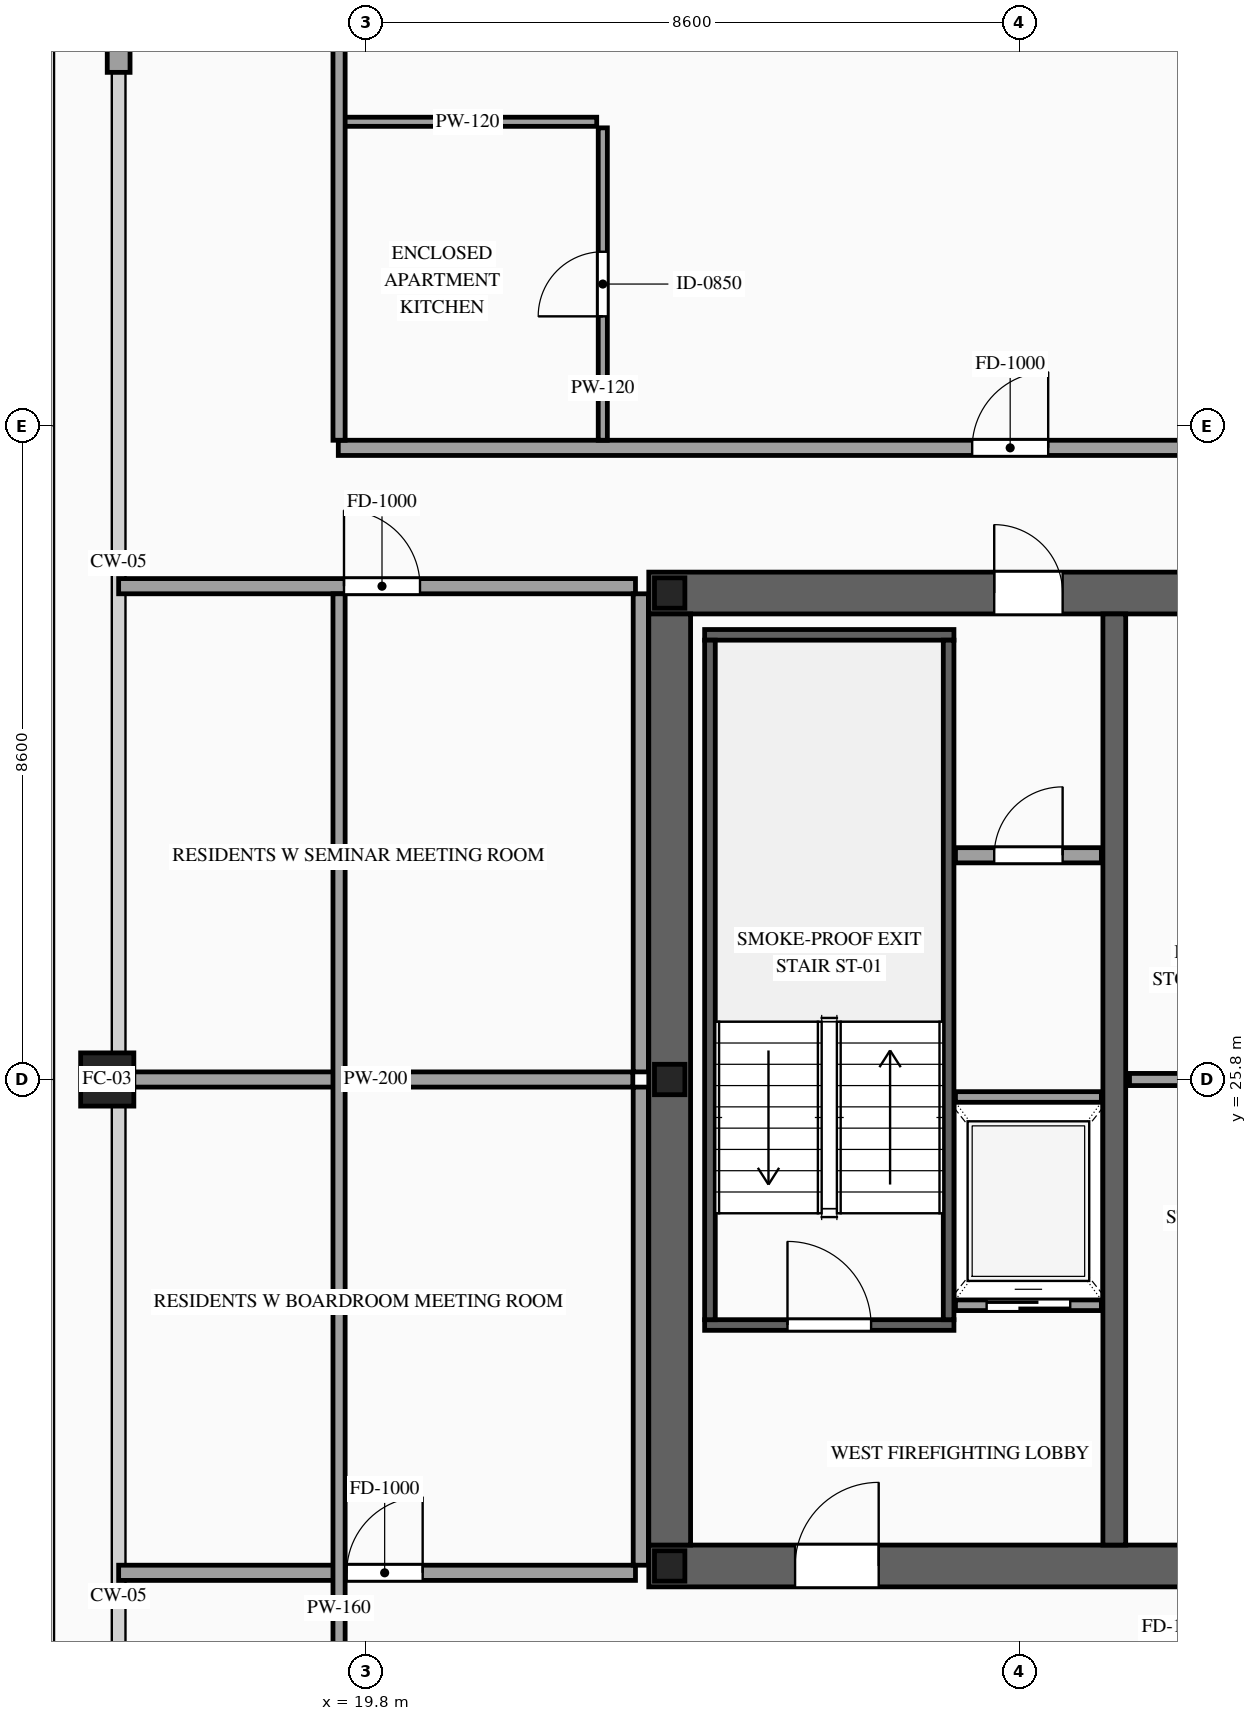
"""IFC4 building model, lengths in metres.
Left out: names, types, materials, properties, quantities, classifications, styles, units other than length and angle.
Written with IfcOpenShell. Run it as: python <this file> out.ifc"""

import sys

from ifc_helpers import new_model, si_unit, direction, frame, frame_2d, origin, origin_2d, place, context, subcontext, project, spatial, rectangle, hollow_rectangle, i_section, extrude, source, transform, mapped, element, fill, save


model = new_model("IFC4")
c1 = context("Model", 3, precision=1e-05, world=origin(), true_north=direction((0.0, 1.0)))
c2 = subcontext(c1, "Body", "Model", "MODEL_VIEW")
j1 = project(units=[si_unit("LENGTHUNIT", "METRE"), si_unit("PLANEANGLEUNIT", "RADIAN")], contexts=[c1])
p1 = place(None, origin())
s1 = spatial("IfcSite", under=j1, at=p1, CompositionType="ELEMENT")
p2 = place(p1, origin())
s2 = spatial("IfcBuilding", under=s1, at=p2, CompositionType="ELEMENT")
p3 = place(p2, frame((0.0, 0.0, 224.1)))
s3 = spatial("IfcBuildingStorey", under=s2, at=p3, CompositionType="ELEMENT", Elevation=224.1)
p4 = place(p3, frame((23.525, 19.4, 0.0), z_axis=(0.0, 0.0, 1.0), x_axis=(1.0, 0.0, 0.0)))
e1 = element("IfcWall", 1, at=p4, inside=s3, PredefinedType="SHEAR", context=c2, shape_type="SweptSolid", body=[
    extrude(rectangle(XDim=26.95, YDim=0.55, at=frame_2d((13.475, 0.0))), origin(), (0.0, 0.0, 1.0), 3.5),
])
p5 = place(p4, frame((1.925, 0.0, 0.0)))
e2 = element("IfcOpeningElement", 2, at=p5, cuts=e1, PredefinedType="OPENING", context=c2, shape_type="SweptSolid", body=[
    extrude(rectangle(XDim=1.1, YDim=2.2, at=frame_2d((0.55, 1.1))), frame((0.0, 0.29, 0.0), z_axis=(0.0, -1.0, 0.0), x_axis=(1.0, 0.0, 0.0)), (0.0, 0.0, 1.0), 0.58),
])
p6 = place(p4, frame((9.825, 0.0, 0.0)))
e3 = element("IfcOpeningElement", 3, at=p6, cuts=e1, PredefinedType="OPENING", context=c2, shape_type="SweptSolid", body=[
    extrude(rectangle(XDim=1.1, YDim=2.2, at=frame_2d((0.55, 1.1))), frame((0.0, 0.29, 0.0), z_axis=(0.0, -1.0, 0.0), x_axis=(1.0, 0.0, 0.0)), (0.0, 0.0, 1.0), 0.58),
])
p7 = place(p4, frame((23.025, 0.0, 0.0)))
e4 = element("IfcOpeningElement", 4, at=p7, cuts=e1, PredefinedType="OPENING", context=c2, shape_type="SweptSolid", body=[
    extrude(rectangle(XDim=1.1, YDim=2.2, at=frame_2d((0.55, 1.1))), frame((0.0, 0.29, 0.0), z_axis=(0.0, -1.0, 0.0), x_axis=(1.0, 0.0, 0.0)), (0.0, 0.0, 1.0), 0.58),
])
p8 = place(p4, frame((19.645, 0.0, 0.0)))
e5 = element("IfcOpeningElement", 5, at=p8, cuts=e1, PredefinedType="OPENING", context=c2, shape_type="SweptSolid", body=[
    extrude(rectangle(XDim=0.9, YDim=2.15, at=frame_2d((0.45, 1.075))), frame((0.0, 0.29, 0.0), z_axis=(0.0, -1.0, 0.0), x_axis=(1.0, 0.0, 0.0)), (0.0, 0.0, 1.0), 0.58),
])
p9 = place(p4, frame((18.205, 0.0, 0.0)))
e6 = element("IfcOpeningElement", 6, at=p9, cuts=e1, PredefinedType="OPENING", context=c2, shape_type="SweptSolid", body=[
    extrude(rectangle(XDim=0.9, YDim=2.15, at=frame_2d((0.45, 1.075))), frame((0.0, 0.29, 0.0), z_axis=(0.0, -1.0, 0.0), x_axis=(1.0, 0.0, 0.0)), (0.0, 0.0, 1.0), 0.58),
])
p10 = place(p3, frame((23.525, 32.2, 0.0), z_axis=(0.0, 0.0, 1.0), x_axis=(1.0, 0.0, 0.0)))
e7 = element("IfcWall", 7, at=p10, inside=s3, PredefinedType="SHEAR", context=c2, shape_type="SweptSolid", body=[
    extrude(rectangle(XDim=26.95, YDim=0.55, at=frame_2d((13.475, 0.0))), origin(), (0.0, 0.0, 1.0), 3.5),
])
p11 = place(p10, frame((4.545, 0.0, 0.0)))
e8 = element("IfcOpeningElement", 8, at=p11, cuts=e7, PredefinedType="OPENING", context=c2, shape_type="SweptSolid", body=[
    extrude(rectangle(XDim=0.9, YDim=2.15, at=frame_2d((0.45, 1.075))), frame((0.0, 0.29, 0.0), z_axis=(0.0, -1.0, 0.0), x_axis=(1.0, 0.0, 0.0)), (0.0, 0.0, 1.0), 0.58),
])
p12 = place(p10, frame((9.825, 0.0, 0.0)))
e9 = element("IfcOpeningElement", 9, at=p12, cuts=e7, PredefinedType="OPENING", context=c2, shape_type="SweptSolid", body=[
    extrude(rectangle(XDim=1.1, YDim=2.2, at=frame_2d((0.55, 1.1))), frame((0.0, 0.29, 0.0), z_axis=(0.0, -1.0, 0.0), x_axis=(1.0, 0.0, 0.0)), (0.0, 0.0, 1.0), 0.58),
])
p13 = place(p10, frame((15.675, 0.0, 0.0)))
e10 = element("IfcOpeningElement", 10, at=p13, cuts=e7, PredefinedType="OPENING", context=c2, shape_type="SweptSolid", body=[
    extrude(rectangle(XDim=1.1, YDim=2.2, at=frame_2d((0.55, 1.1))), frame((0.0, 0.29, 0.0), z_axis=(0.0, -1.0, 0.0), x_axis=(1.0, 0.0, 0.0)), (0.0, 0.0, 1.0), 0.58),
])
p14 = place(p10, frame((19.645, 0.0, 0.0)))
e11 = element("IfcOpeningElement", 11, at=p14, cuts=e7, PredefinedType="OPENING", context=c2, shape_type="SweptSolid", body=[
    extrude(rectangle(XDim=0.9, YDim=2.15, at=frame_2d((0.45, 1.075))), frame((0.0, 0.29, 0.0), z_axis=(0.0, -1.0, 0.0), x_axis=(1.0, 0.0, 0.0)), (0.0, 0.0, 1.0), 0.58),
])
m1 = source(origin(), c2, "Body", "SweptSolid", [
    extrude(rectangle(XDim=12.25, YDim=0.55, at=frame_2d((6.125, 0.0))), origin(), (0.0, 0.0, 1.0), 3.5),
])
p15 = place(p3, frame((23.8, 19.675, 0.0), z_axis=(0.0, 0.0, 1.0), x_axis=(0.0, 1.0, 0.0)))
e12 = element("IfcWall", 12, at=p15, inside=s3, PredefinedType="SHEAR", context=c2, shape_type="MappedRepresentation", body=[
    mapped(m1, transform((0.0, 0.0, 0.0), scale=1.0)),
])
m2 = source(origin(), c2, "Body", "SweptSolid", [
    extrude(rectangle(XDim=12.25, YDim=0.3, at=frame_2d((6.125, 0.0))), origin(), (0.0, 0.0, 1.0), 3.5),
])
p16 = place(p3, frame((29.65, 19.675, 0.0), z_axis=(0.0, 0.0, 1.0), x_axis=(0.0, 1.0, 0.0)))
e13 = element("IfcWall", 13, at=p16, inside=s3, PredefinedType="SOLIDWALL", context=c2, shape_type="MappedRepresentation", body=[
    mapped(m2, transform((0.0, 0.0, 0.0), scale=1.0)),
])
m3 = source(origin(), c2, "Body", "SweptSolid", [
    extrude(i_section(OverallWidth=0.4, OverallDepth=0.4, WebThickness=0.013, FlangeThickness=0.021, at=origin_2d()), origin(), (0.0, 0.0, 1.0), 3.5),
])
for number, where, z_axis, x_axis in (
    (14, (23.8, 19.4, 0.0), (0.0, 0.0, 1.0), (1.0, 0.0, 0.0)),
    (15, (23.8, 25.8, 0.0), (0.0, 0.0, 1.0), (1.0, 0.0, 0.0)),
    (16, (23.8, 32.2, 0.0), (0.0, 0.0, 1.0), (1.0, 0.0, 0.0)),
):
    element("IfcColumn", number, at=place(p3, frame(where, z_axis=z_axis, x_axis=x_axis)), inside=s3, PredefinedType="COLUMN", context=c2, shape_type="MappedRepresentation", body=[
        mapped(m3, transform((0.0, 0.0, 0.0), scale=1.0)),
    ])
m4 = source(origin(), c2, "Body", "SweptSolid", [
    extrude(hollow_rectangle(XDim=0.7, YDim=0.7, WallThickness=0.032, at=origin_2d()), origin(), (0.0, 0.0, 1.0), 3.5),
])
p17 = place(p3, frame((16.4, 25.8, 0.0), z_axis=(0.0, 0.0, 1.0), x_axis=(1.0, 0.0, 0.0)))
e17 = element("IfcColumn", 17, at=p17, inside=s3, PredefinedType="COLUMN", context=c2, shape_type="MappedRepresentation", body=[
    mapped(m4, transform((0.0, 0.0, 0.0), scale=1.0)),
])
m5 = source(origin(), c2, "Body", "SweptSolid", [
    extrude(rectangle(XDim=3.15, YDim=0.3, at=frame_2d((1.575, 0.0))), origin(), (0.0, 0.0, 1.0), 2.835),
])
p18 = place(p3, frame((16.55, 39.05, 0.0), z_axis=(0.0, 0.0, 1.0), x_axis=(0.0, 1.0, 0.0)))
e18 = element("IfcWall", 18, at=p18, inside=s3, PredefinedType="SOLIDWALL", context=c2, shape_type="MappedRepresentation", body=[
    mapped(m5, transform((0.0, 0.0, 0.0), scale=1.0)),
])
p19 = place(p3, frame((27.56, 22.83, 0.0), z_axis=(0.0, 0.0, 1.0), x_axis=(1.0, 0.0, 0.0)))
e19 = element("IfcWall", 19, at=p19, inside=s3, PredefinedType="SOLIDWALL", context=c2, shape_type="SweptSolid", body=[
    extrude(rectangle(XDim=1.92, YDim=0.14, at=frame_2d((0.96, 0.0))), origin(), (0.0, 0.0, 1.0), 3.28),
])
p20 = place(p19, frame((0.41, 0.0, 0.0)))
e20 = element("IfcOpeningElement", 20, at=p20, cuts=e19, PredefinedType="OPENING", context=c2, shape_type="SweptSolid", body=[
    extrude(rectangle(XDim=1.1, YDim=2.2, at=frame_2d((0.55, 1.1))), frame((0.0, 0.085, 0.0), z_axis=(0.0, -1.0, 0.0), x_axis=(1.0, 0.0, 0.0)), (0.0, 0.0, 1.0), 0.17),
])
m6 = source(origin(), c2, "Body", "SweptSolid", [
    extrude(rectangle(XDim=1.92, YDim=0.14, at=frame_2d((0.96, 0.0))), origin(), (0.0, 0.0, 1.0), 3.28),
])
p21 = place(p3, frame((27.56, 25.57, 0.0), z_axis=(0.0, 0.0, 1.0), x_axis=(1.0, 0.0, 0.0)))
e21 = element("IfcWall", 21, at=p21, inside=s3, PredefinedType="SOLIDWALL", context=c2, shape_type="MappedRepresentation", body=[
    mapped(m6, transform((0.0, 0.0, 0.0), scale=1.0)),
])
p22 = place(p3, frame((24.26, 22.57, 0.0), z_axis=(0.0, 0.0, 1.0), x_axis=(1.0, 0.0, 0.0)))
e22 = element("IfcWall", 22, at=p22, inside=s3, PredefinedType="SOLIDWALL", context=c2, shape_type="SweptSolid", body=[
    extrude(rectangle(XDim=3.28, YDim=0.14, at=frame_2d((1.64, 0.0))), origin(), (0.0, 0.0, 1.0), 3.28),
])
p23 = place(p22, frame((1.09, 0.0, 0.0)))
e23 = element("IfcOpeningElement", 23, at=p23, cuts=e22, PredefinedType="OPENING", context=c2, shape_type="SweptSolid", body=[
    extrude(rectangle(XDim=1.1, YDim=2.2, at=frame_2d((0.55, 1.1))), frame((0.0, 0.085, 0.0), z_axis=(0.0, -1.0, 0.0), x_axis=(1.0, 0.0, 0.0)), (0.0, 0.0, 1.0), 0.17),
])
m7 = source(origin(), c2, "Body", "SweptSolid", [
    extrude(rectangle(XDim=3.28, YDim=0.14, at=frame_2d((1.64, 0.0))), origin(), (0.0, 0.0, 1.0), 3.28),
])
p24 = place(p3, frame((24.26, 31.65, 0.0), z_axis=(0.0, 0.0, 1.0), x_axis=(1.0, 0.0, 0.0)))
e24 = element("IfcWall", 24, at=p24, inside=s3, PredefinedType="SOLIDWALL", context=c2, shape_type="MappedRepresentation", body=[
    mapped(m7, transform((0.0, 0.0, 0.0), scale=1.0)),
])
m8 = source(origin(), c2, "Body", "SweptSolid", [
    extrude(rectangle(XDim=8.94, YDim=0.14, at=frame_2d((4.47, 0.0))), origin(), (0.0, 0.0, 1.0), 3.28),
])
for number, where, z_axis, x_axis in (
    (25, (24.33, 22.64, 0.0), (0.0, 0.0, 1.0), (0.0, 1.0, 0.0)),
    (26, (27.47, 22.64, 0.0), (0.0, 0.0, 1.0), (0.0, 1.0, 0.0)),
):
    element("IfcWall", number, at=place(p3, frame(where, z_axis=z_axis, x_axis=x_axis)), inside=s3, PredefinedType="SOLIDWALL", context=c2, shape_type="MappedRepresentation", body=[
        mapped(m8, transform((0.0, 0.0, 0.0), scale=1.0)),
    ])
p25 = place(p3, frame((27.56, 28.75, 0.0), z_axis=(0.0, 0.0, 1.0), x_axis=(1.0, 0.0, 0.0)))
e27 = element("IfcWall", 27, at=p25, inside=s3, PredefinedType="PARTITIONING", context=c2, shape_type="SweptSolid", body=[
    extrude(rectangle(XDim=1.92, YDim=0.2, at=frame_2d((0.96, 0.0))), origin(), (0.0, 0.0, 1.0), 3.28),
])
p26 = place(p25, frame((0.51, 0.0, 0.0)))
e28 = element("IfcOpeningElement", 28, at=p26, cuts=e27, PredefinedType="OPENING", context=c2, shape_type="SweptSolid", body=[
    extrude(rectangle(XDim=0.9, YDim=2.15, at=frame_2d((0.45, 1.075))), frame((0.0, 0.115, 0.0), z_axis=(0.0, -1.0, 0.0), x_axis=(1.0, 0.0, 0.0)), (0.0, 0.0, 1.0), 0.23),
])
m9 = source(origin(), c2, "Body", "SweptSolid", [
    extrude(rectangle(XDim=2.47, YDim=0.16, at=frame_2d((1.235, 0.0))), origin(), (0.0, 0.0, 1.0), 3.28),
])
p27 = place(p3, frame((29.85, 25.8, 0.0), z_axis=(0.0, 0.0, 1.0), x_axis=(1.0, 0.0, 0.0)))
e29 = element("IfcWall", 29, at=p27, inside=s3, PredefinedType="PARTITIONING", context=c2, shape_type="MappedRepresentation", body=[
    mapped(m9, transform((0.0, 0.0, 0.0), scale=1.0)),
])
p28 = place(p3, frame((19.44, 34.11, 0.0), z_axis=(0.0, 0.0, 1.0), x_axis=(1.0, 0.0, 0.0)))
e30 = element("IfcWall", 30, at=p28, inside=s3, PredefinedType="PARTITIONING", context=c2, shape_type="SweptSolid", body=[
    extrude(rectangle(XDim=17.48, YDim=0.2, at=frame_2d((8.74, 0.0))), origin(), (0.0, 0.0, 1.0), 3.28),
])
p29 = place(p28, frame((8.34, 0.0, 0.0)))
e31 = element("IfcOpeningElement", 31, at=p29, cuts=e30, PredefinedType="OPENING", context=c2, shape_type="SweptSolid", body=[
    extrude(rectangle(XDim=1.0, YDim=2.2, at=frame_2d((0.5, 1.1))), frame((0.0, 0.115, 0.0), z_axis=(0.0, -1.0, 0.0), x_axis=(1.0, 0.0, 0.0)), (0.0, 0.0, 1.0), 0.23),
])
m10 = source(origin(), c2, "Body", "SweptSolid", [
    extrude(rectangle(XDim=3.4, YDim=0.12, at=frame_2d((1.7, 0.0))), origin(), (0.0, 0.0, 1.0), 3.28),
])
p30 = place(p3, frame((19.44, 38.4, 0.0), z_axis=(0.0, 0.0, 1.0), x_axis=(1.0, 0.0, 0.0)))
e32 = element("IfcWall", 32, at=p30, inside=s3, PredefinedType="PARTITIONING", context=c2, shape_type="MappedRepresentation", body=[
    mapped(m10, transform((0.0, 0.0, 0.0), scale=1.0)),
])
p31 = place(p3, frame((22.92, 34.21, 0.0), z_axis=(0.0, 0.0, 1.0), x_axis=(0.0, 1.0, 0.0)))
e33 = element("IfcWall", 33, at=p31, inside=s3, PredefinedType="PARTITIONING", context=c2, shape_type="SweptSolid", body=[
    extrude(rectangle(XDim=4.11, YDim=0.12, at=frame_2d((2.055, 0.0))), origin(), (0.0, 0.0, 1.0), 3.28),
])
p32 = place(p31, frame((1.63, 0.0, 0.0)))
e34 = element("IfcOpeningElement", 34, at=p32, cuts=e33, PredefinedType="OPENING", context=c2, shape_type="SweptSolid", body=[
    extrude(rectangle(XDim=0.85, YDim=2.1, at=frame_2d((0.425, 1.05))), frame((0.0, 0.075, 0.0), z_axis=(0.0, -1.0, 0.0), x_axis=(1.0, 0.0, 0.0)), (0.0, 0.0, 1.0), 0.15),
])
m11 = source(origin(), c2, "Body", "SweptSolid", [
    extrude(rectangle(XDim=11.89, YDim=0.16, at=frame_2d((5.945, 0.0))), origin(), (0.0, 0.0, 1.0), 3.28),
])
p33 = place(p3, frame((19.45, 34.21, 0.0), z_axis=(0.0, 0.0, 1.0), x_axis=(0.0, 1.0, 0.0)))
e35 = element("IfcWall", 35, at=p33, inside=s3, PredefinedType="PARTITIONING", context=c2, shape_type="MappedRepresentation", body=[
    mapped(m11, transform((0.0, 0.0, 0.0), scale=1.0)),
])
p34 = place(p3, frame((16.55, 19.31, 0.0), z_axis=(0.0, 0.0, 1.0), x_axis=(1.0, 0.0, 0.0)))
e36 = element("IfcWall", 36, at=p34, inside=s3, PredefinedType="PARTITIONING", context=c2, shape_type="SweptSolid", body=[
    extrude(rectangle(XDim=6.8, YDim=0.2, at=frame_2d((3.4, 0.0))), origin(), (0.0, 0.0, 1.0), 2.825),
])
p35 = place(p34, frame((3.0, 0.0, 0.0)))
e37 = element("IfcOpeningElement", 37, at=p35, cuts=e36, PredefinedType="OPENING", context=c2, shape_type="SweptSolid", body=[
    extrude(rectangle(XDim=1.0, YDim=2.2, at=frame_2d((0.5, 1.1))), frame((0.0, 0.115, 0.0), z_axis=(0.0, -1.0, 0.0), x_axis=(1.0, 0.0, 0.0)), (0.0, 0.0, 1.0), 0.23),
])
m12 = source(origin(), c2, "Body", "SweptSolid", [
    extrude(rectangle(XDim=6.765, YDim=0.2, at=frame_2d((3.382, 0.0))), origin(), (0.0, 0.0, 1.0), 2.787),
])
p36 = place(p3, frame((16.55, 25.8, 0.0), z_axis=(0.0, 0.0, 1.0), x_axis=(1.0, 0.0, 0.0)))
e38 = element("IfcWall", 38, at=p36, inside=s3, PredefinedType="PARTITIONING", context=c2, shape_type="MappedRepresentation", body=[
    mapped(m12, transform((0.0, 0.0, 0.0), scale=1.0)),
])
m13 = source(origin(), c2, "Body", "SweptSolid", [
    extrude(rectangle(XDim=6.29, YDim=0.2, at=frame_2d((3.145, 0.0))), origin(), (0.0, 0.0, 1.0), 3.28),
])
p37 = place(p3, frame((23.42, 19.41, 0.0), z_axis=(0.0, 0.0, 1.0), x_axis=(0.0, 1.0, 0.0)))
e39 = element("IfcWall", 39, at=p37, inside=s3, PredefinedType="PARTITIONING", context=c2, shape_type="MappedRepresentation", body=[
    mapped(m13, transform((0.0, 0.0, 0.0), scale=1.0)),
])
p38 = place(p3, frame((16.55, 32.29, 0.0), z_axis=(0.0, 0.0, 1.0), x_axis=(1.0, 0.0, 0.0)))
e40 = element("IfcWall", 40, at=p38, inside=s3, PredefinedType="PARTITIONING", context=c2, shape_type="SweptSolid", body=[
    extrude(rectangle(XDim=6.8, YDim=0.2, at=frame_2d((3.4, 0.0))), origin(), (0.0, 0.0, 1.0), 2.825),
])
p39 = place(p38, frame((2.965, 0.0, 0.0)))
e41 = element("IfcOpeningElement", 41, at=p39, cuts=e40, PredefinedType="OPENING", context=c2, shape_type="SweptSolid", body=[
    extrude(rectangle(XDim=1.0, YDim=2.2, at=frame_2d((0.5, 1.1))), frame((0.0, 0.115, 0.0), z_axis=(0.0, -1.0, 0.0), x_axis=(1.0, 0.0, 0.0)), (0.0, 0.0, 1.0), 0.23),
])
m14 = source(origin(), c2, "Body", "SweptSolid", [
    extrude(rectangle(XDim=26.69, YDim=0.16, at=frame_2d((13.345, 0.0))), origin(), (0.0, 0.0, 1.0), 3.28),
])
p40 = place(p3, frame((19.45, 5.5, 0.0), z_axis=(0.0, 0.0, 1.0), x_axis=(0.0, 1.0, 0.0)))
e42 = element("IfcWall", 42, at=p40, inside=s3, PredefinedType="PARTITIONING", context=c2, shape_type="MappedRepresentation", body=[
    mapped(m14, transform((0.0, 0.0, 0.0), scale=1.0)),
])
p41 = place(p3, frame((23.42, 25.9, 0.0), z_axis=(0.0, 0.0, 1.0), x_axis=(0.0, 1.0, 0.0)))
e43 = element("IfcWall", 43, at=p41, inside=s3, PredefinedType="PARTITIONING", context=c2, shape_type="MappedRepresentation", body=[
    mapped(m13, transform((0.0, 0.0, 0.0), scale=1.0)),
])
m15 = source(origin(), c2, "Body", "SweptSolid", [
    extrude(rectangle(XDim=1.1, YDim=2.2, at=frame_2d((0.55, 1.1))), frame((0.0, 0.025, 0.0), z_axis=(0.0, -1.0, 0.0), x_axis=(1.0, 0.0, 0.0)), (0.0, 0.0, 1.0), 0.05),
])
p42 = place(p20, origin())
e44 = element("IfcDoor", 44, at=p42, inside=s3, OperationType="SLIDING_TO_LEFT", PredefinedType="DOOR", context=c2, shape_type="MappedRepresentation", body=[
    mapped(m15, transform((0.0, 0.0, 0.0), scale=1.0)),
])
fill(e20, e44)
m16 = source(origin(), c2, "Body", "SweptSolid", [
    extrude(rectangle(XDim=1.1, YDim=2.2, at=frame_2d((0.55, 1.1))), frame((0.0, 0.025, 0.0), z_axis=(0.0, -1.0, 0.0), x_axis=(1.0, 0.0, 0.0)), (0.0, 0.0, 1.0), 0.05),
])
p43 = place(p23, origin())
e45 = element("IfcDoor", 45, at=p43, inside=s3, OperationType="SINGLE_SWING_LEFT", PredefinedType="DOOR", context=c2, shape_type="MappedRepresentation", body=[
    mapped(m16, transform((0.0, 0.0, 0.0), scale=1.0)),
])
fill(e23, e45)
p44 = place(p5, origin())
e46 = element("IfcDoor", 46, at=p44, inside=s3, OperationType="SINGLE_SWING_RIGHT", PredefinedType="DOOR", context=c2, shape_type="MappedRepresentation", body=[
    mapped(m16, transform((0.0, 0.0, 0.0), scale=1.0)),
])
fill(e2, e46)
m17 = source(origin(), c2, "Body", "SweptSolid", [
    extrude(rectangle(XDim=0.9, YDim=2.15, at=frame_2d((0.45, 1.075))), frame((0.0, 0.025, 0.0), z_axis=(0.0, -1.0, 0.0), x_axis=(1.0, 0.0, 0.0)), (0.0, 0.0, 1.0), 0.05),
])
p45 = place(p11, origin())
e47 = element("IfcDoor", 47, at=p45, inside=s3, OperationType="SINGLE_SWING_LEFT", PredefinedType="DOOR", context=c2, shape_type="MappedRepresentation", body=[
    mapped(m17, transform((0.0, 0.0, 0.0), scale=1.0)),
])
fill(e8, e47)
p46 = place(p26, origin())
e48 = element("IfcDoor", 48, at=p46, inside=s3, OperationType="SINGLE_SWING_RIGHT", PredefinedType="DOOR", context=c2, shape_type="MappedRepresentation", body=[
    mapped(m17, transform((0.0, 0.0, 0.0), scale=1.0)),
])
fill(e28, e48)
m18 = source(origin(), c2, "Body", "SweptSolid", [
    extrude(rectangle(XDim=1.0, YDim=2.2, at=frame_2d((0.5, 1.1))), frame((0.0, 0.025, 0.0), z_axis=(0.0, -1.0, 0.0), x_axis=(1.0, 0.0, 0.0)), (0.0, 0.0, 1.0), 0.05),
])
p47 = place(p29, origin())
e49 = element("IfcDoor", 49, at=p47, inside=s3, OperationType="SINGLE_SWING_RIGHT", PredefinedType="DOOR", context=c2, shape_type="MappedRepresentation", body=[
    mapped(m18, transform((0.0, 0.0, 0.0), scale=1.0)),
])
fill(e31, e49)
m19 = source(origin(), c2, "Body", "SweptSolid", [
    extrude(rectangle(XDim=0.85, YDim=2.1, at=frame_2d((0.425, 1.05))), frame((0.0, 0.025, 0.0), z_axis=(0.0, -1.0, 0.0), x_axis=(1.0, 0.0, 0.0)), (0.0, 0.0, 1.0), 0.05),
])
p48 = place(p32, origin())
e50 = element("IfcDoor", 50, at=p48, inside=s3, OperationType="SINGLE_SWING_LEFT", PredefinedType="DOOR", context=c2, shape_type="MappedRepresentation", body=[
    mapped(m19, transform((0.0, 0.0, 0.0), scale=1.0)),
])
fill(e34, e50)
p49 = place(p35, origin())
e51 = element("IfcDoor", 51, at=p49, inside=s3, OperationType="SINGLE_SWING_RIGHT", PredefinedType="DOOR", context=c2, shape_type="MappedRepresentation", body=[
    mapped(m18, transform((0.0, 0.0, 0.0), scale=1.0)),
])
fill(e37, e51)
p50 = place(p39, origin())
e52 = element("IfcDoor", 52, at=p50, inside=s3, OperationType="SINGLE_SWING_LEFT", PredefinedType="DOOR", context=c2, shape_type="MappedRepresentation", body=[
    mapped(m18, transform((0.0, 0.0, 0.0), scale=1.0)),
])
fill(e41, e52)
save(model, sys.argv[1])
